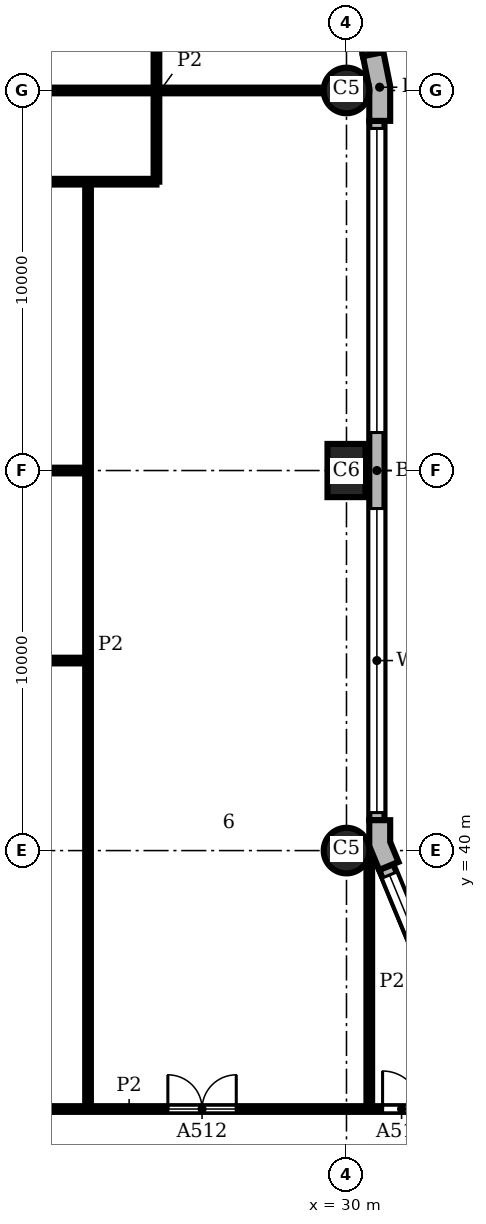
"""IFC4 building model, lengths in metres.
Left out: names, types, materials, properties, quantities, classifications, styles, units other than length and angle.
Written with IfcOpenShell. Run it as: python <this file> out.ifc"""

import sys

from ifc_helpers import new_model, si_unit, direction, frame, frame_2d, origin, origin_2d, place, context, subcontext, project, spatial, polyline, rectangle, circle, outline, extrude, element, fill, save


model = new_model("IFC4")
c1 = context("Model", 3, precision=1e-05, world=origin(), true_north=direction((0.0, 1.0)))
c2 = subcontext(c1, "Body", "Model", "MODEL_VIEW")
j1 = project(units=[si_unit("LENGTHUNIT", "METRE"), si_unit("PLANEANGLEUNIT", "RADIAN")], contexts=[c1])
p1 = place(None, origin())
s1 = spatial("IfcSite", under=j1, at=p1, CompositionType="ELEMENT")
p2 = place(p1, origin())
s2 = spatial("IfcBuilding", under=s1, at=p2, CompositionType="ELEMENT")
p3 = place(p2, frame((0.0, 0.0, 58.8)))
s3 = spatial("IfcBuildingStorey", under=s2, at=p3, CompositionType="ELEMENT", Elevation=58.8)
p4 = place(p3, frame((30.0, 40.0, 0.0), z_axis=(0.0, 0.0, 1.0), x_axis=(1.0, 0.0, 0.0)))
e1 = element("IfcColumn", 1, at=p4, inside=s3, PredefinedType="COLUMN", context=c2, shape_type="SweptSolid", body=[
    extrude(circle(Radius=0.6, at=origin_2d()), origin(), (0.0, 0.0, 1.0), 3.9),
])
p5 = place(p3, frame((30.0, 50.0, 0.0), z_axis=(0.0, 0.0, 1.0), x_axis=(0.0, 1.0, 0.0)))
e2 = element("IfcColumn", 2, at=p5, inside=s3, PredefinedType="COLUMN", context=c2, shape_type="SweptSolid", body=[
    extrude(rectangle(XDim=1.4, YDim=1.0, at=origin_2d()), origin(), (0.0, 0.0, 1.0), 3.9),
])
p6 = place(p3, frame((30.0, 60.0, 0.0), z_axis=(0.0, 0.0, 1.0), x_axis=(1.0, 0.0, 0.0)))
e3 = element("IfcColumn", 3, at=p6, inside=s3, PredefinedType="COLUMN", context=c2, shape_type="SweptSolid", body=[
    extrude(circle(Radius=0.6, at=origin_2d()), origin(), (0.0, 0.0, 1.0), 3.9),
])
p7 = place(p3, origin())
e4 = element("IfcWall", 4, at=p7, inside=s3, PredefinedType="SOLIDWALL", context=c2, shape_type="SweptSolid", body=[
    extrude(outline(polyline([(31.23, 39.644), (31.369, 39.701), (31.15, 40.229), (31.15, 40.8), (31.0, 40.8), (30.6, 40.8), (30.6, 40.119), (30.861, 39.49), (31.23, 39.644)])), origin(), (0.0, 0.0, 1.0), 3.9),
])
e5 = element("IfcWall", 5, at=p7, inside=s3, PredefinedType="SOLIDWALL", context=c2, shape_type="SweptSolid", body=[
    extrude(outline(polyline([(31.0, 59.2), (31.15, 59.2), (31.15, 60.113), (30.972, 61.009), (30.825, 60.98), (30.432, 60.902), (30.6, 60.059), (30.6, 59.2), (31.0, 59.2)])), origin(), (0.0, 0.0, 1.0), 3.9),
])
p8 = place(p3, frame((33.362, 33.974, 0.0), z_axis=(0.0, 0.0, 1.0), x_axis=(-0.382655745237, 0.923891000409, 0.0)))
e6 = element("IfcWall", 6, at=p8, inside=s3, PredefinedType="SOLIDWALL", context=c2, shape_type="SweptSolid", body=[
    extrude(rectangle(XDim=6.053, YDim=0.4, at=frame_2d((3.027, 0.0))), origin(), (0.0, 0.0, 1.0), 3.9),
])
p9 = place(p8, frame((0.227, 0.0, 0.9)))
e7 = element("IfcOpeningElement", 7, at=p9, cuts=e6, PredefinedType="OPENING", context=c2, shape_type="SweptSolid", body=[
    extrude(rectangle(XDim=5.6, YDim=2.35, at=frame_2d((2.8, 1.175))), frame((0.0, 0.21, 0.0), z_axis=(0.0, -1.0, 0.0), x_axis=(1.0, 0.0, 0.0)), (0.0, 0.0, 1.0), 0.42),
])
p10 = place(p3, frame((30.8, 40.8, 0.0), z_axis=(0.0, 0.0, 1.0), x_axis=(0.0, 1.0, 0.0)))
e8 = element("IfcWall", 8, at=p10, inside=s3, PredefinedType="SOLIDWALL", context=c2, shape_type="SweptSolid", body=[
    extrude(rectangle(XDim=18.4, YDim=0.4, at=frame_2d((9.2, 0.0))), origin(), (0.0, 0.0, 1.0), 3.9),
])
p11 = place(p10, frame((0.2, 0.0, 0.9)))
e9 = element("IfcOpeningElement", 9, at=p11, cuts=e8, PredefinedType="OPENING", context=c2, shape_type="SweptSolid", body=[
    extrude(rectangle(XDim=8.0, YDim=2.35, at=frame_2d((4.0, 1.175))), frame((0.0, 0.21, 0.0), z_axis=(0.0, -1.0, 0.0), x_axis=(1.0, 0.0, 0.0)), (0.0, 0.0, 1.0), 0.42),
])
p12 = place(p10, frame((10.2, 0.0, 0.9)))
e10 = element("IfcOpeningElement", 10, at=p12, cuts=e8, PredefinedType="OPENING", context=c2, shape_type="SweptSolid", body=[
    extrude(rectangle(XDim=8.0, YDim=2.35, at=frame_2d((4.0, 1.175))), frame((0.0, 0.21, 0.0), z_axis=(0.0, -1.0, 0.0), x_axis=(1.0, 0.0, 0.0)), (0.0, 0.0, 1.0), 0.42),
])
p13 = place(p3, frame((30.629, 60.941, 0.0), z_axis=(0.0, 0.0, 1.0), x_axis=(-0.195098533057, 0.98078364709, 0.0)))
e11 = element("IfcWall", 11, at=p13, inside=s3, PredefinedType="SOLIDWALL", context=c2, shape_type="SweptSolid", body=[
    extrude(rectangle(XDim=4.753, YDim=0.4, at=frame_2d((2.376, 0.0))), origin(), (0.0, 0.0, 1.0), 3.9),
])
p14 = place(p13, frame((0.226, 0.0, 0.9)))
e12 = element("IfcOpeningElement", 12, at=p14, cuts=e11, PredefinedType="OPENING", context=c2, shape_type="SweptSolid", body=[
    extrude(rectangle(XDim=4.3, YDim=2.35, at=frame_2d((2.15, 1.175))), frame((0.0, 0.21, 0.0), z_axis=(0.0, -1.0, 0.0), x_axis=(1.0, 0.0, 0.0)), (0.0, 0.0, 1.0), 0.42),
])
p15 = place(p3, frame((23.2, 33.2, 0.0), z_axis=(0.0, 0.0, 1.0), x_axis=(0.0, 1.0, 0.0)))
e13 = element("IfcWall", 13, at=p15, inside=s3, PredefinedType="PARTITIONING", context=c2, shape_type="SweptSolid", body=[
    extrude(rectangle(XDim=24.4, YDim=0.15, at=frame_2d((12.2, 0.0))), origin(), (0.0, 0.0, 1.0), 3.58),
])
p16 = place(p3, frame((25.0, 57.6, 0.0), z_axis=(0.0, 0.0, 1.0), x_axis=(0.0, 1.0, 0.0)))
e14 = element("IfcWall", 14, at=p16, inside=s3, PredefinedType="PARTITIONING", context=c2, shape_type="SweptSolid", body=[
    extrude(rectangle(XDim=10.4, YDim=0.15, at=frame_2d((5.2, 0.0))), origin(), (0.0, 0.0, 1.0), 3.58),
])
p17 = place(p3, frame((30.6, 33.2, 0.0), z_axis=(0.0, 0.0, 1.0), x_axis=(0.0, 1.0, 0.0)))
e15 = element("IfcWall", 15, at=p17, inside=s3, PredefinedType="PARTITIONING", context=c2, shape_type="SweptSolid", body=[
    extrude(rectangle(XDim=6.699, YDim=0.15, at=frame_2d((3.35, 0.0))), origin(), (0.0, 0.0, 1.0), 3.58),
])
p18 = place(p3, frame((16.2, 33.2, 0.0), z_axis=(0.0, 0.0, 1.0), x_axis=(1.0, 0.0, 0.0)))
e16 = element("IfcWall", 16, at=p18, inside=s3, PredefinedType="PARTITIONING", context=c2, shape_type="SweptSolid", body=[
    extrude(rectangle(XDim=16.162, YDim=0.15, at=frame_2d((8.081, 0.0))), origin(), (0.0, 0.0, 1.0), 3.58),
])
p19 = place(p18, frame((9.1, 0.0, 0.0)))
e17 = element("IfcOpeningElement", 17, at=p19, cuts=e16, PredefinedType="OPENING", context=c2, shape_type="SweptSolid", body=[
    extrude(rectangle(XDim=1.8, YDim=2.1, at=frame_2d((0.9, 1.05))), frame((0.0, 0.085, 0.0), z_axis=(0.0, -1.0, 0.0), x_axis=(1.0, 0.0, 0.0)), (0.0, 0.0, 1.0), 0.17),
])
p20 = place(p18, frame((14.75, 0.0, 0.0)))
e18 = element("IfcOpeningElement", 18, at=p20, cuts=e16, PredefinedType="OPENING", context=c2, shape_type="SweptSolid", body=[
    extrude(rectangle(XDim=1.0, YDim=2.1, at=frame_2d((0.5, 1.05))), frame((0.0, 0.085, 0.0), z_axis=(0.0, -1.0, 0.0), x_axis=(1.0, 0.0, 0.0)), (0.0, 0.0, 1.0), 0.17),
])
p21 = place(p3, frame((16.2, 45.0, 0.0), z_axis=(0.0, 0.0, 1.0), x_axis=(1.0, 0.0, 0.0)))
e19 = element("IfcWall", 19, at=p21, inside=s3, PredefinedType="PARTITIONING", context=c2, shape_type="SweptSolid", body=[
    extrude(rectangle(XDim=7.0, YDim=0.15, at=frame_2d((3.5, 0.0))), origin(), (0.0, 0.0, 1.0), 3.58),
])
p22 = place(p3, frame((20.8, 50.0, 0.0), z_axis=(0.0, 0.0, 1.0), x_axis=(1.0, 0.0, 0.0)))
e20 = element("IfcWall", 20, at=p22, inside=s3, PredefinedType="PARTITIONING", context=c2, shape_type="SweptSolid", body=[
    extrude(rectangle(XDim=2.4, YDim=0.15, at=frame_2d((1.2, 0.0))), origin(), (0.0, 0.0, 1.0), 3.58),
])
p23 = place(p3, frame((16.2, 57.6, 0.0), z_axis=(0.0, 0.0, 1.0), x_axis=(1.0, 0.0, 0.0)))
e21 = element("IfcWall", 21, at=p23, inside=s3, PredefinedType="PARTITIONING", context=c2, shape_type="SweptSolid", body=[
    extrude(rectangle(XDim=8.8, YDim=0.15, at=frame_2d((4.4, 0.0))), origin(), (0.0, 0.0, 1.0), 3.58),
])
p24 = place(p3, frame((20.8, 60.0, 0.0), z_axis=(0.0, 0.0, 1.0), x_axis=(1.0, 0.0, 0.0)))
e22 = element("IfcWall", 22, at=p24, inside=s3, PredefinedType="PARTITIONING", context=c2, shape_type="SweptSolid", body=[
    extrude(rectangle(XDim=8.6, YDim=0.15, at=frame_2d((4.3, 0.0))), origin(), (0.0, 0.0, 1.0), 3.58),
])
p25 = place(p9, origin())
e23 = element("IfcWindow", 23, at=p25, inside=s3, PartitioningType="SINGLE_PANEL", PredefinedType="WINDOW", context=c2, shape_type="SweptSolid", body=[
    extrude(rectangle(XDim=5.6, YDim=2.35, at=frame_2d((2.8, 1.175))), frame((0.0, 0.16, 0.0), z_axis=(0.0, -1.0, 0.0), x_axis=(1.0, 0.0, 0.0)), (0.0, 0.0, 1.0), 0.06),
])
fill(e7, e23)
p26 = place(p11, origin())
e24 = element("IfcWindow", 24, at=p26, inside=s3, PartitioningType="SINGLE_PANEL", PredefinedType="WINDOW", context=c2, shape_type="SweptSolid", body=[
    extrude(rectangle(XDim=8.0, YDim=2.35, at=frame_2d((4.0, 1.175))), frame((0.0, 0.16, 0.0), z_axis=(0.0, -1.0, 0.0), x_axis=(1.0, 0.0, 0.0)), (0.0, 0.0, 1.0), 0.06),
])
fill(e9, e24)
p27 = place(p12, origin())
e25 = element("IfcWindow", 25, at=p27, inside=s3, PartitioningType="SINGLE_PANEL", PredefinedType="WINDOW", context=c2, shape_type="SweptSolid", body=[
    extrude(rectangle(XDim=8.0, YDim=2.35, at=frame_2d((4.0, 1.175))), frame((0.0, 0.16, 0.0), z_axis=(0.0, -1.0, 0.0), x_axis=(1.0, 0.0, 0.0)), (0.0, 0.0, 1.0), 0.06),
])
fill(e10, e25)
p28 = place(p19, origin())
e26 = element("IfcDoor", 26, at=p28, inside=s3, OperationType="DOUBLE_DOOR_SINGLE_SWING", PredefinedType="DOOR", context=c2, shape_type="SweptSolid", body=[
    extrude(rectangle(XDim=1.8, YDim=2.1, at=frame_2d((0.9, 1.05))), frame((0.0, 0.025, 0.0), z_axis=(0.0, -1.0, 0.0), x_axis=(1.0, 0.0, 0.0)), (0.0, 0.0, 1.0), 0.05),
])
fill(e17, e26)
p29 = place(p20, origin())
e27 = element("IfcDoor", 27, at=p29, inside=s3, OperationType="SINGLE_SWING_LEFT", PredefinedType="DOOR", context=c2, shape_type="SweptSolid", body=[
    extrude(rectangle(XDim=1.0, YDim=2.1, at=frame_2d((0.5, 1.05))), frame((0.0, 0.025, 0.0), z_axis=(0.0, -1.0, 0.0), x_axis=(1.0, 0.0, 0.0)), (0.0, 0.0, 1.0), 0.05),
])
fill(e18, e27)
save(model, sys.argv[1])
